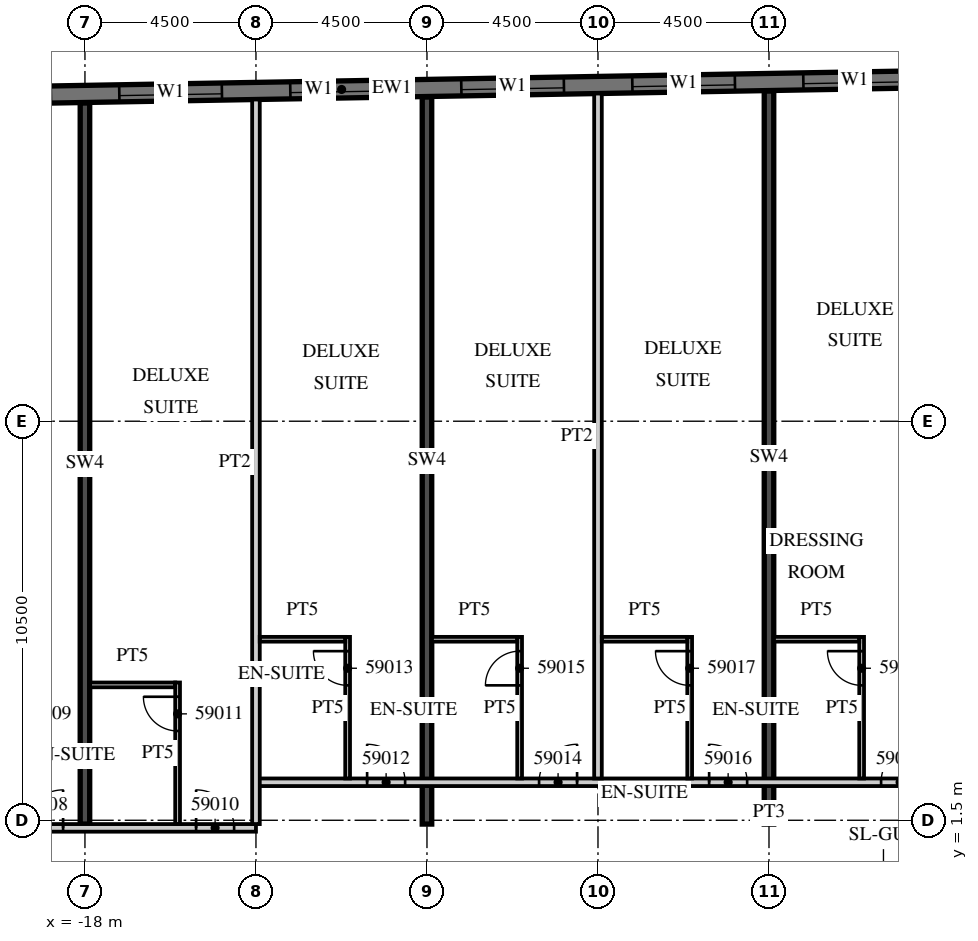
"""IFC4 building model, lengths in metres.
Left out: names, types, materials, properties, quantities, classifications, styles, units other than length and angle.
Written with IfcOpenShell. Run it as: python <this file> out.ifc"""

import sys

from ifc_helpers import new_model, si_unit, direction, frame, frame_2d, origin, place, context, subcontext, project, spatial, rectangle, extrude, element, fill, save


model = new_model("IFC4")
c1 = context("Model", 3, precision=1e-05, world=origin(), true_north=direction((0.0, 1.0)))
c2 = subcontext(c1, "Body", "Model", "MODEL_VIEW")
j1 = project(units=[si_unit("LENGTHUNIT", "METRE"), si_unit("PLANEANGLEUNIT", "RADIAN")], contexts=[c1])
p1 = place(None, origin())
s1 = spatial("IfcSite", under=j1, at=p1, CompositionType="ELEMENT")
p2 = place(p1, origin())
s2 = spatial("IfcBuilding", under=s1, at=p2, CompositionType="ELEMENT")
p3 = place(p2, frame((0.0, 0.0, 240.8)))
s3 = spatial("IfcBuildingStorey", under=s2, at=p3, CompositionType="ELEMENT", Elevation=240.8)
p4 = place(p3, frame((-18.0, 1.4, 0.0), z_axis=(0.0, 0.0, 1.0), x_axis=(0.0, 1.0, 0.0)))
e1 = element("IfcWall", 1, at=p4, inside=s3, PredefinedType="SHEAR", context=c2, shape_type="SweptSolid", body=[
    extrude(rectangle(XDim=18.974, YDim=0.25, at=frame_2d((9.487, 0.0))), origin(), (0.0, 0.0, 1.0), 3.3),
])
p5 = place(p3, frame((-9.0, 1.4, 0.0), z_axis=(0.0, 0.0, 1.0), x_axis=(0.0, 1.0, 0.0)))
e2 = element("IfcWall", 2, at=p5, inside=s3, PredefinedType="SHEAR", context=c2, shape_type="SweptSolid", body=[
    extrude(rectangle(XDim=19.132, YDim=0.25, at=frame_2d((9.566, 0.0))), origin(), (0.0, 0.0, 1.0), 3.3),
])
p6 = place(p3, frame((0.0, 1.4, 0.0), z_axis=(0.0, 0.0, 1.0), x_axis=(0.0, 1.0, 0.0)))
e3 = element("IfcWall", 3, at=p6, inside=s3, PredefinedType="SHEAR", context=c2, shape_type="SweptSolid", body=[
    extrude(rectangle(XDim=19.289, YDim=0.25, at=frame_2d((9.644, 0.0))), origin(), (0.0, 0.0, 1.0), 3.3),
])
p7 = place(p3, frame((13.504, 21.161, 0.0), z_axis=(0.0, 0.0, 1.0), x_axis=(-0.999847763257, -0.017448504532, 0.0)))
e4 = element("IfcWall", 4, at=p7, inside=s3, PredefinedType="SOLIDWALL", context=c2, shape_type="SweptSolid", body=[
    extrude(rectangle(XDim=46.859, YDim=0.45, at=frame_2d((23.43, 0.0))), origin(), (0.0, 0.0, 1.0), 3.02),
])
p8 = place(p7, frame((0.9, 0.0, 0.45)))
e5 = element("IfcOpeningElement", 5, at=p8, cuts=e4, PredefinedType="OPENING", context=c2, shape_type="SweptSolid", body=[
    extrude(rectangle(XDim=2.7, YDim=2.25, at=frame_2d((1.35, 1.125))), frame((0.0, 0.235, 0.0), z_axis=(0.0, -1.0, 0.0), x_axis=(1.0, 0.0, 0.0)), (0.0, 0.0, 1.0), 0.47),
])
p9 = place(p7, frame((5.401, 0.0, 0.45)))
e6 = element("IfcOpeningElement", 6, at=p9, cuts=e4, PredefinedType="OPENING", context=c2, shape_type="SweptSolid", body=[
    extrude(rectangle(XDim=2.7, YDim=2.25, at=frame_2d((1.35, 1.125))), frame((0.0, 0.235, 0.0), z_axis=(0.0, -1.0, 0.0), x_axis=(1.0, 0.0, 0.0)), (0.0, 0.0, 1.0), 0.47),
])
p10 = place(p7, frame((9.902, 0.0, 0.45)))
e7 = element("IfcOpeningElement", 7, at=p10, cuts=e4, PredefinedType="OPENING", context=c2, shape_type="SweptSolid", body=[
    extrude(rectangle(XDim=2.7, YDim=2.25, at=frame_2d((1.35, 1.125))), frame((0.0, 0.235, 0.0), z_axis=(0.0, -1.0, 0.0), x_axis=(1.0, 0.0, 0.0)), (0.0, 0.0, 1.0), 0.47),
])
p11 = place(p7, frame((14.402, 0.0, 0.45)))
e8 = element("IfcOpeningElement", 8, at=p11, cuts=e4, PredefinedType="OPENING", context=c2, shape_type="SweptSolid", body=[
    extrude(rectangle(XDim=2.7, YDim=2.25, at=frame_2d((1.35, 1.125))), frame((0.0, 0.235, 0.0), z_axis=(0.0, -1.0, 0.0), x_axis=(1.0, 0.0, 0.0)), (0.0, 0.0, 1.0), 0.47),
])
p12 = place(p7, frame((18.903, 0.0, 0.45)))
e9 = element("IfcOpeningElement", 9, at=p12, cuts=e4, PredefinedType="OPENING", context=c2, shape_type="SweptSolid", body=[
    extrude(rectangle(XDim=2.7, YDim=2.25, at=frame_2d((1.35, 1.125))), frame((0.0, 0.235, 0.0), z_axis=(0.0, -1.0, 0.0), x_axis=(1.0, 0.0, 0.0)), (0.0, 0.0, 1.0), 0.47),
])
p13 = place(p7, frame((23.404, 0.0, 0.45)))
e10 = element("IfcOpeningElement", 10, at=p13, cuts=e4, PredefinedType="OPENING", context=c2, shape_type="SweptSolid", body=[
    extrude(rectangle(XDim=2.7, YDim=2.25, at=frame_2d((1.35, 1.125))), frame((0.0, 0.235, 0.0), z_axis=(0.0, -1.0, 0.0), x_axis=(1.0, 0.0, 0.0)), (0.0, 0.0, 1.0), 0.47),
])
p14 = place(p7, frame((27.904, 0.0, 0.45)))
e11 = element("IfcOpeningElement", 11, at=p14, cuts=e4, PredefinedType="OPENING", context=c2, shape_type="SweptSolid", body=[
    extrude(rectangle(XDim=2.7, YDim=2.25, at=frame_2d((1.35, 1.125))), frame((0.0, 0.235, 0.0), z_axis=(0.0, -1.0, 0.0), x_axis=(1.0, 0.0, 0.0)), (0.0, 0.0, 1.0), 0.47),
])
p15 = place(p7, frame((32.405, 0.0, 0.45)))
e12 = element("IfcOpeningElement", 12, at=p15, cuts=e4, PredefinedType="OPENING", context=c2, shape_type="SweptSolid", body=[
    extrude(rectangle(XDim=2.7, YDim=2.25, at=frame_2d((1.35, 1.125))), frame((0.0, 0.235, 0.0), z_axis=(0.0, -1.0, 0.0), x_axis=(1.0, 0.0, 0.0)), (0.0, 0.0, 1.0), 0.47),
])
p16 = place(p7, frame((36.906, 0.0, 0.45)))
e13 = element("IfcOpeningElement", 13, at=p16, cuts=e4, PredefinedType="OPENING", context=c2, shape_type="SweptSolid", body=[
    extrude(rectangle(XDim=2.7, YDim=2.25, at=frame_2d((1.35, 1.125))), frame((0.0, 0.235, 0.0), z_axis=(0.0, -1.0, 0.0), x_axis=(1.0, 0.0, 0.0)), (0.0, 0.0, 1.0), 0.47),
])
p17 = place(p7, frame((41.406, 0.0, 0.45)))
e14 = element("IfcOpeningElement", 14, at=p17, cuts=e4, PredefinedType="OPENING", context=c2, shape_type="SweptSolid", body=[
    extrude(rectangle(XDim=2.7, YDim=2.25, at=frame_2d((1.35, 1.125))), frame((0.0, 0.235, 0.0), z_axis=(0.0, -1.0, 0.0), x_axis=(1.0, 0.0, 0.0)), (0.0, 0.0, 1.0), 0.47),
])
p18 = place(p3, frame((-36.566, 1.3, 0.0), z_axis=(0.0, 0.0, 1.0), x_axis=(1.0, 0.0, 0.0)))
e15 = element("IfcWall", 15, at=p18, inside=s3, PredefinedType="PARTITIONING", context=c2, shape_type="SweptSolid", body=[
    extrude(rectangle(XDim=23.066, YDim=0.2, at=frame_2d((11.533, 0.0))), origin(), (0.0, 0.0, 1.0), 3.02),
])
p19 = place(p18, frame((1.141, 0.0, 0.0)))
e16 = element("IfcOpeningElement", 16, at=p19, cuts=e15, PredefinedType="OPENING", context=c2, shape_type="SweptSolid", body=[
    extrude(rectangle(XDim=1.0, YDim=2.1, at=frame_2d((0.5, 1.05))), frame((0.0, 0.11, 0.0), z_axis=(0.0, -1.0, 0.0), x_axis=(1.0, 0.0, 0.0)), (0.0, 0.0, 1.0), 0.22),
])
p20 = place(p18, frame((5.616, 0.0, 0.0)))
e17 = element("IfcOpeningElement", 17, at=p20, cuts=e15, PredefinedType="OPENING", context=c2, shape_type="SweptSolid", body=[
    extrude(rectangle(XDim=1.0, YDim=2.1, at=frame_2d((0.5, 1.05))), frame((0.0, 0.11, 0.0), z_axis=(0.0, -1.0, 0.0), x_axis=(1.0, 0.0, 0.0)), (0.0, 0.0, 1.0), 0.22),
])
p21 = place(p18, frame((10.141, 0.0, 0.0)))
e18 = element("IfcOpeningElement", 18, at=p21, cuts=e15, PredefinedType="OPENING", context=c2, shape_type="SweptSolid", body=[
    extrude(rectangle(XDim=1.0, YDim=2.1, at=frame_2d((0.5, 1.05))), frame((0.0, 0.11, 0.0), z_axis=(0.0, -1.0, 0.0), x_axis=(1.0, 0.0, 0.0)), (0.0, 0.0, 1.0), 0.22),
])
p22 = place(p18, frame((16.991, 0.0, 0.0)))
e19 = element("IfcOpeningElement", 19, at=p22, cuts=e15, PredefinedType="OPENING", context=c2, shape_type="SweptSolid", body=[
    extrude(rectangle(XDim=1.0, YDim=2.1, at=frame_2d((0.5, 1.05))), frame((0.0, 0.11, 0.0), z_axis=(0.0, -1.0, 0.0), x_axis=(1.0, 0.0, 0.0)), (0.0, 0.0, 1.0), 0.22),
])
p23 = place(p18, frame((21.491, 0.0, 0.0)))
e20 = element("IfcOpeningElement", 20, at=p23, cuts=e15, PredefinedType="OPENING", context=c2, shape_type="SweptSolid", body=[
    extrude(rectangle(XDim=1.0, YDim=2.1, at=frame_2d((0.5, 1.05))), frame((0.0, 0.11, 0.0), z_axis=(0.0, -1.0, 0.0), x_axis=(1.0, 0.0, 0.0)), (0.0, 0.0, 1.0), 0.22),
])
p24 = place(p3, frame((-13.5, 2.5, 0.0), z_axis=(0.0, 0.0, 1.0), x_axis=(1.0, 0.0, 0.0)))
e21 = element("IfcWall", 21, at=p24, inside=s3, PredefinedType="PARTITIONING", context=c2, shape_type="SweptSolid", body=[
    extrude(rectangle(XDim=27.0, YDim=0.2, at=frame_2d((13.5, 0.0))), origin(), (0.0, 0.0, 1.0), 3.02),
])
p25 = place(p24, frame((2.925, 0.0, 0.0)))
e22 = element("IfcOpeningElement", 22, at=p25, cuts=e21, PredefinedType="OPENING", context=c2, shape_type="SweptSolid", body=[
    extrude(rectangle(XDim=1.0, YDim=2.1, at=frame_2d((0.5, 1.05))), frame((0.0, 0.11, 0.0), z_axis=(0.0, -1.0, 0.0), x_axis=(1.0, 0.0, 0.0)), (0.0, 0.0, 1.0), 0.22),
])
p26 = place(p24, frame((7.45, 0.0, 0.0)))
e23 = element("IfcOpeningElement", 23, at=p26, cuts=e21, PredefinedType="OPENING", context=c2, shape_type="SweptSolid", body=[
    extrude(rectangle(XDim=1.0, YDim=2.1, at=frame_2d((0.5, 1.05))), frame((0.0, 0.11, 0.0), z_axis=(0.0, -1.0, 0.0), x_axis=(1.0, 0.0, 0.0)), (0.0, 0.0, 1.0), 0.22),
])
p27 = place(p24, frame((11.925, 0.0, 0.0)))
e24 = element("IfcOpeningElement", 24, at=p27, cuts=e21, PredefinedType="OPENING", context=c2, shape_type="SweptSolid", body=[
    extrude(rectangle(XDim=1.0, YDim=2.1, at=frame_2d((0.5, 1.05))), frame((0.0, 0.11, 0.0), z_axis=(0.0, -1.0, 0.0), x_axis=(1.0, 0.0, 0.0)), (0.0, 0.0, 1.0), 0.22),
])
p28 = place(p24, frame((16.45, 0.0, 0.0)))
e25 = element("IfcOpeningElement", 25, at=p28, cuts=e21, PredefinedType="OPENING", context=c2, shape_type="SweptSolid", body=[
    extrude(rectangle(XDim=1.0, YDim=2.1, at=frame_2d((0.5, 1.05))), frame((0.0, 0.11, 0.0), z_axis=(0.0, -1.0, 0.0), x_axis=(1.0, 0.0, 0.0)), (0.0, 0.0, 1.0), 0.22),
])
p29 = place(p24, frame((18.55, 0.0, 0.0)))
e26 = element("IfcOpeningElement", 26, at=p29, cuts=e21, PredefinedType="OPENING", context=c2, shape_type="SweptSolid", body=[
    extrude(rectangle(XDim=1.0, YDim=2.1, at=frame_2d((0.5, 1.05))), frame((0.0, 0.11, 0.0), z_axis=(0.0, -1.0, 0.0), x_axis=(1.0, 0.0, 0.0)), (0.0, 0.0, 1.0), 0.22),
])
p30 = place(p24, frame((23.075, 0.0, 0.0)))
e27 = element("IfcOpeningElement", 27, at=p30, cuts=e21, PredefinedType="OPENING", context=c2, shape_type="SweptSolid", body=[
    extrude(rectangle(XDim=1.0, YDim=2.1, at=frame_2d((0.5, 1.05))), frame((0.0, 0.11, 0.0), z_axis=(0.0, -1.0, 0.0), x_axis=(1.0, 0.0, 0.0)), (0.0, 0.0, 1.0), 0.22),
])
p31 = place(p3, frame((-13.5, 1.4, 0.0), z_axis=(0.0, 0.0, 1.0), x_axis=(0.0, 1.0, 0.0)))
e28 = element("IfcWall", 28, at=p31, inside=s3, PredefinedType="PARTITIONING", context=c2, shape_type="SweptSolid", body=[
    extrude(rectangle(XDim=19.065, YDim=0.2, at=frame_2d((9.533, 0.0))), origin(), (0.0, 0.0, 1.0), 3.02),
])
p32 = place(p3, frame((-15.562, 1.4, 0.0), z_axis=(0.0, 0.0, 1.0), x_axis=(0.0, 1.0, 0.0)))
e29 = element("IfcWall", 29, at=p32, inside=s3, PredefinedType="PARTITIONING", context=c2, shape_type="SweptSolid", body=[
    extrude(rectangle(XDim=3.725, YDim=0.125, at=frame_2d((1.863, 0.0))), origin(), (0.0, 0.0, 1.0), 3.02),
])
p33 = place(p32, frame((2.45, 0.0, 0.0)))
e30 = element("IfcOpeningElement", 30, at=p33, cuts=e29, PredefinedType="OPENING", context=c2, shape_type="SweptSolid", body=[
    extrude(rectangle(XDim=0.9, YDim=2.1, at=frame_2d((0.45, 1.05))), frame((0.0, 0.073, 0.0), z_axis=(0.0, -1.0, 0.0), x_axis=(1.0, 0.0, 0.0)), (0.0, 0.0, 1.0), 0.145),
])
p34 = place(p3, frame((-17.875, 5.062, 0.0), z_axis=(0.0, 0.0, 1.0), x_axis=(1.0, 0.0, 0.0)))
e31 = element("IfcWall", 31, at=p34, inside=s3, PredefinedType="PARTITIONING", context=c2, shape_type="SweptSolid", body=[
    extrude(rectangle(XDim=2.25, YDim=0.125, at=frame_2d((1.125, 0.0))), origin(), (0.0, 0.0, 1.0), 3.02),
])
p35 = place(p3, frame((-11.088, 2.6, 0.0), z_axis=(0.0, 0.0, 1.0), x_axis=(0.0, 1.0, 0.0)))
e32 = element("IfcWall", 32, at=p35, inside=s3, PredefinedType="PARTITIONING", context=c2, shape_type="SweptSolid", body=[
    extrude(rectangle(XDim=3.725, YDim=0.125, at=frame_2d((1.862, 0.0))), origin(), (0.0, 0.0, 1.0), 3.02),
])
p36 = place(p35, frame((2.45, 0.0, 0.0)))
e33 = element("IfcOpeningElement", 33, at=p36, cuts=e32, PredefinedType="OPENING", context=c2, shape_type="SweptSolid", body=[
    extrude(rectangle(XDim=0.9, YDim=2.1, at=frame_2d((0.45, 1.05))), frame((0.0, 0.073, 0.0), z_axis=(0.0, -1.0, 0.0), x_axis=(1.0, 0.0, 0.0)), (0.0, 0.0, 1.0), 0.145),
])
p37 = place(p3, frame((-13.4, 6.263, 0.0), z_axis=(0.0, 0.0, 1.0), x_axis=(1.0, 0.0, 0.0)))
e34 = element("IfcWall", 34, at=p37, inside=s3, PredefinedType="PARTITIONING", context=c2, shape_type="SweptSolid", body=[
    extrude(rectangle(XDim=2.25, YDim=0.125, at=frame_2d((1.125, 0.0))), origin(), (0.0, 0.0, 1.0), 3.02),
])
p38 = place(p3, frame((-4.5, 2.6, 0.0), z_axis=(0.0, 0.0, 1.0), x_axis=(0.0, 1.0, 0.0)))
e35 = element("IfcWall", 35, at=p38, inside=s3, PredefinedType="PARTITIONING", context=c2, shape_type="SweptSolid", body=[
    extrude(rectangle(XDim=18.022, YDim=0.2, at=frame_2d((9.011, 0.0))), origin(), (0.0, 0.0, 1.0), 3.02),
])
p39 = place(p3, frame((-6.562, 2.6, 0.0), z_axis=(0.0, 0.0, 1.0), x_axis=(0.0, 1.0, 0.0)))
e36 = element("IfcWall", 36, at=p39, inside=s3, PredefinedType="PARTITIONING", context=c2, shape_type="SweptSolid", body=[
    extrude(rectangle(XDim=3.725, YDim=0.125, at=frame_2d((1.862, 0.0))), origin(), (0.0, 0.0, 1.0), 3.02),
])
p40 = place(p39, frame((2.45, 0.0, 0.0)))
e37 = element("IfcOpeningElement", 37, at=p40, cuts=e36, PredefinedType="OPENING", context=c2, shape_type="SweptSolid", body=[
    extrude(rectangle(XDim=0.9, YDim=2.1, at=frame_2d((0.45, 1.05))), frame((0.0, 0.073, 0.0), z_axis=(0.0, -1.0, 0.0), x_axis=(1.0, 0.0, 0.0)), (0.0, 0.0, 1.0), 0.145),
])
p41 = place(p3, frame((-8.875, 6.263, 0.0), z_axis=(0.0, 0.0, 1.0), x_axis=(1.0, 0.0, 0.0)))
e38 = element("IfcWall", 38, at=p41, inside=s3, PredefinedType="PARTITIONING", context=c2, shape_type="SweptSolid", body=[
    extrude(rectangle(XDim=2.25, YDim=0.125, at=frame_2d((1.125, 0.0))), origin(), (0.0, 0.0, 1.0), 3.02),
])
p42 = place(p3, frame((-2.087, 2.6, 0.0), z_axis=(0.0, 0.0, 1.0), x_axis=(0.0, 1.0, 0.0)))
e39 = element("IfcWall", 39, at=p42, inside=s3, PredefinedType="PARTITIONING", context=c2, shape_type="SweptSolid", body=[
    extrude(rectangle(XDim=3.725, YDim=0.125, at=frame_2d((1.862, 0.0))), origin(), (0.0, 0.0, 1.0), 3.02),
])
p43 = place(p42, frame((2.45, 0.0, 0.0)))
e40 = element("IfcOpeningElement", 40, at=p43, cuts=e39, PredefinedType="OPENING", context=c2, shape_type="SweptSolid", body=[
    extrude(rectangle(XDim=0.9, YDim=2.1, at=frame_2d((0.45, 1.05))), frame((0.0, 0.073, 0.0), z_axis=(0.0, -1.0, 0.0), x_axis=(1.0, 0.0, 0.0)), (0.0, 0.0, 1.0), 0.145),
])
p44 = place(p3, frame((-4.4, 6.263, 0.0), z_axis=(0.0, 0.0, 1.0), x_axis=(1.0, 0.0, 0.0)))
e41 = element("IfcWall", 41, at=p44, inside=s3, PredefinedType="PARTITIONING", context=c2, shape_type="SweptSolid", body=[
    extrude(rectangle(XDim=2.25, YDim=0.125, at=frame_2d((1.125, 0.0))), origin(), (0.0, 0.0, 1.0), 3.02),
])
p45 = place(p3, frame((2.438, 2.6, 0.0), z_axis=(0.0, 0.0, 1.0), x_axis=(0.0, 1.0, 0.0)))
e42 = element("IfcWall", 42, at=p45, inside=s3, PredefinedType="PARTITIONING", context=c2, shape_type="SweptSolid", body=[
    extrude(rectangle(XDim=3.725, YDim=0.125, at=frame_2d((1.862, 0.0))), origin(), (0.0, 0.0, 1.0), 3.02),
])
p46 = place(p45, frame((2.45, 0.0, 0.0)))
e43 = element("IfcOpeningElement", 43, at=p46, cuts=e42, PredefinedType="OPENING", context=c2, shape_type="SweptSolid", body=[
    extrude(rectangle(XDim=0.9, YDim=2.1, at=frame_2d((0.45, 1.05))), frame((0.0, 0.073, 0.0), z_axis=(0.0, -1.0, 0.0), x_axis=(1.0, 0.0, 0.0)), (0.0, 0.0, 1.0), 0.145),
])
p47 = place(p3, frame((0.125, 6.263, 0.0), z_axis=(0.0, 0.0, 1.0), x_axis=(1.0, 0.0, 0.0)))
e44 = element("IfcWall", 44, at=p47, inside=s3, PredefinedType="PARTITIONING", context=c2, shape_type="SweptSolid", body=[
    extrude(rectangle(XDim=2.25, YDim=0.125, at=frame_2d((1.125, 0.0))), origin(), (0.0, 0.0, 1.0), 3.02),
])
p48 = place(p10, origin())
e45 = element("IfcWindow", 45, at=p48, inside=s3, PartitioningType="SINGLE_PANEL", PredefinedType="WINDOW", context=c2, shape_type="SweptSolid", body=[
    extrude(rectangle(XDim=2.7, YDim=2.25, at=frame_2d((1.35, 1.125))), frame((0.0, 0.09, 0.0), z_axis=(0.0, -1.0, 0.0), x_axis=(1.0, 0.0, 0.0)), (0.0, 0.0, 1.0), 0.06),
])
fill(e7, e45)
p49 = place(p11, origin())
e46 = element("IfcWindow", 46, at=p49, inside=s3, PartitioningType="SINGLE_PANEL", PredefinedType="WINDOW", context=c2, shape_type="SweptSolid", body=[
    extrude(rectangle(XDim=2.7, YDim=2.25, at=frame_2d((1.35, 1.125))), frame((0.0, 0.09, 0.0), z_axis=(0.0, -1.0, 0.0), x_axis=(1.0, 0.0, 0.0)), (0.0, 0.0, 1.0), 0.06),
])
fill(e8, e46)
p50 = place(p12, origin())
e47 = element("IfcWindow", 47, at=p50, inside=s3, PartitioningType="SINGLE_PANEL", PredefinedType="WINDOW", context=c2, shape_type="SweptSolid", body=[
    extrude(rectangle(XDim=2.7, YDim=2.25, at=frame_2d((1.35, 1.125))), frame((0.0, 0.09, 0.0), z_axis=(0.0, -1.0, 0.0), x_axis=(1.0, 0.0, 0.0)), (0.0, 0.0, 1.0), 0.06),
])
fill(e9, e47)
p51 = place(p13, origin())
e48 = element("IfcWindow", 48, at=p51, inside=s3, PartitioningType="SINGLE_PANEL", PredefinedType="WINDOW", context=c2, shape_type="SweptSolid", body=[
    extrude(rectangle(XDim=2.7, YDim=2.25, at=frame_2d((1.35, 1.125))), frame((0.0, 0.09, 0.0), z_axis=(0.0, -1.0, 0.0), x_axis=(1.0, 0.0, 0.0)), (0.0, 0.0, 1.0), 0.06),
])
fill(e10, e48)
p52 = place(p14, origin())
e49 = element("IfcWindow", 49, at=p52, inside=s3, PartitioningType="SINGLE_PANEL", PredefinedType="WINDOW", context=c2, shape_type="SweptSolid", body=[
    extrude(rectangle(XDim=2.7, YDim=2.25, at=frame_2d((1.35, 1.125))), frame((0.0, 0.09, 0.0), z_axis=(0.0, -1.0, 0.0), x_axis=(1.0, 0.0, 0.0)), (0.0, 0.0, 1.0), 0.06),
])
fill(e11, e49)
p53 = place(p22, origin())
e50 = element("IfcDoor", 50, at=p53, inside=s3, OperationType="SINGLE_SWING_RIGHT", PredefinedType="DOOR", context=c2, shape_type="SweptSolid", body=[
    extrude(rectangle(XDim=1.0, YDim=2.1, at=frame_2d((0.5, 1.05))), frame((0.0, 0.025, 0.0), z_axis=(0.0, -1.0, 0.0), x_axis=(1.0, 0.0, 0.0)), (0.0, 0.0, 1.0), 0.05),
])
fill(e19, e50)
p54 = place(p23, origin())
e51 = element("IfcDoor", 51, at=p54, inside=s3, OperationType="SINGLE_SWING_LEFT", PredefinedType="DOOR", context=c2, shape_type="SweptSolid", body=[
    extrude(rectangle(XDim=1.0, YDim=2.1, at=frame_2d((0.5, 1.05))), frame((0.0, 0.025, 0.0), z_axis=(0.0, -1.0, 0.0), x_axis=(1.0, 0.0, 0.0)), (0.0, 0.0, 1.0), 0.05),
])
fill(e20, e51)
p55 = place(p33, origin())
e52 = element("IfcDoor", 52, at=p55, inside=s3, OperationType="SINGLE_SWING_RIGHT", PredefinedType="DOOR", context=c2, shape_type="SweptSolid", body=[
    extrude(rectangle(XDim=0.9, YDim=2.1, at=frame_2d((0.45, 1.05))), frame((0.0, 0.025, 0.0), z_axis=(0.0, -1.0, 0.0), x_axis=(1.0, 0.0, 0.0)), (0.0, 0.0, 1.0), 0.05),
])
fill(e30, e52)
p56 = place(p25, origin())
e53 = element("IfcDoor", 53, at=p56, inside=s3, OperationType="SINGLE_SWING_LEFT", PredefinedType="DOOR", context=c2, shape_type="SweptSolid", body=[
    extrude(rectangle(XDim=1.0, YDim=2.1, at=frame_2d((0.5, 1.05))), frame((0.0, 0.025, 0.0), z_axis=(0.0, -1.0, 0.0), x_axis=(1.0, 0.0, 0.0)), (0.0, 0.0, 1.0), 0.05),
])
fill(e22, e53)
p57 = place(p36, origin())
e54 = element("IfcDoor", 54, at=p57, inside=s3, OperationType="SINGLE_SWING_RIGHT", PredefinedType="DOOR", context=c2, shape_type="SweptSolid", body=[
    extrude(rectangle(XDim=0.9, YDim=2.1, at=frame_2d((0.45, 1.05))), frame((0.0, 0.025, 0.0), z_axis=(0.0, -1.0, 0.0), x_axis=(1.0, 0.0, 0.0)), (0.0, 0.0, 1.0), 0.05),
])
fill(e33, e54)
p58 = place(p26, origin())
e55 = element("IfcDoor", 55, at=p58, inside=s3, OperationType="SINGLE_SWING_RIGHT", PredefinedType="DOOR", context=c2, shape_type="SweptSolid", body=[
    extrude(rectangle(XDim=1.0, YDim=2.1, at=frame_2d((0.5, 1.05))), frame((0.0, 0.025, 0.0), z_axis=(0.0, -1.0, 0.0), x_axis=(1.0, 0.0, 0.0)), (0.0, 0.0, 1.0), 0.05),
])
fill(e23, e55)
p59 = place(p40, origin())
e56 = element("IfcDoor", 56, at=p59, inside=s3, OperationType="SINGLE_SWING_LEFT", PredefinedType="DOOR", context=c2, shape_type="SweptSolid", body=[
    extrude(rectangle(XDim=0.9, YDim=2.1, at=frame_2d((0.45, 1.05))), frame((0.0, 0.025, 0.0), z_axis=(0.0, -1.0, 0.0), x_axis=(1.0, 0.0, 0.0)), (0.0, 0.0, 1.0), 0.05),
])
fill(e37, e56)
p60 = place(p27, origin())
e57 = element("IfcDoor", 57, at=p60, inside=s3, OperationType="SINGLE_SWING_LEFT", PredefinedType="DOOR", context=c2, shape_type="SweptSolid", body=[
    extrude(rectangle(XDim=1.0, YDim=2.1, at=frame_2d((0.5, 1.05))), frame((0.0, 0.025, 0.0), z_axis=(0.0, -1.0, 0.0), x_axis=(1.0, 0.0, 0.0)), (0.0, 0.0, 1.0), 0.05),
])
fill(e24, e57)
p61 = place(p43, origin())
e58 = element("IfcDoor", 58, at=p61, inside=s3, OperationType="SINGLE_SWING_RIGHT", PredefinedType="DOOR", context=c2, shape_type="SweptSolid", body=[
    extrude(rectangle(XDim=0.9, YDim=2.1, at=frame_2d((0.45, 1.05))), frame((0.0, 0.025, 0.0), z_axis=(0.0, -1.0, 0.0), x_axis=(1.0, 0.0, 0.0)), (0.0, 0.0, 1.0), 0.05),
])
fill(e40, e58)
p62 = place(p28, origin())
e59 = element("IfcDoor", 59, at=p62, inside=s3, OperationType="SINGLE_SWING_RIGHT", PredefinedType="DOOR", context=c2, shape_type="SweptSolid", body=[
    extrude(rectangle(XDim=1.0, YDim=2.1, at=frame_2d((0.5, 1.05))), frame((0.0, 0.025, 0.0), z_axis=(0.0, -1.0, 0.0), x_axis=(1.0, 0.0, 0.0)), (0.0, 0.0, 1.0), 0.05),
])
fill(e25, e59)
p63 = place(p46, origin())
e60 = element("IfcDoor", 60, at=p63, inside=s3, OperationType="SINGLE_SWING_RIGHT", PredefinedType="DOOR", context=c2, shape_type="SweptSolid", body=[
    extrude(rectangle(XDim=0.9, YDim=2.1, at=frame_2d((0.45, 1.05))), frame((0.0, 0.025, 0.0), z_axis=(0.0, -1.0, 0.0), x_axis=(1.0, 0.0, 0.0)), (0.0, 0.0, 1.0), 0.05),
])
fill(e43, e60)
save(model, sys.argv[1])
